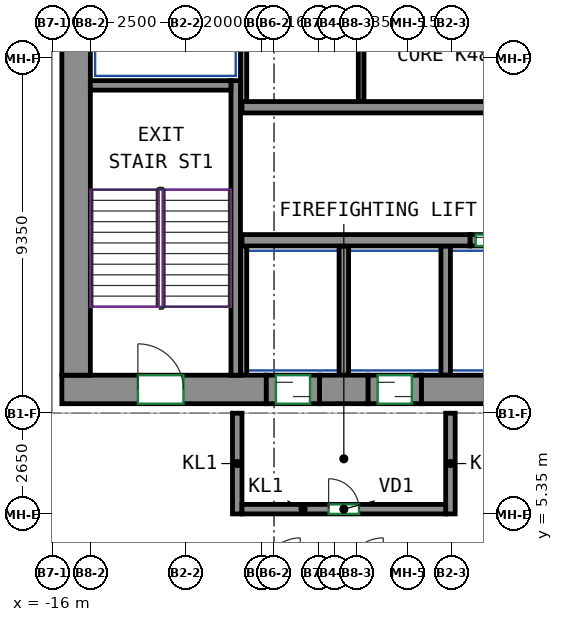
"""IFC4 building model, lengths in metres.
Left out: names, types, materials, properties, quantities, classifications, styles, units other than length and angle.
Written with IfcOpenShell. Run it as: python <this file> out.ifc"""

import sys

from ifc_helpers import new_model, si_unit, direction, frame, frame_2d, origin, place, context, subcontext, project, spatial, rectangle, extrude, source, transform, mapped, element, fill, save


model = new_model("IFC4")
c1 = context("Model", 3, precision=1e-05, world=origin(), true_north=direction((0.0, 1.0)))
c2 = subcontext(c1, "Body", "Model", "MODEL_VIEW")
j1 = project(units=[si_unit("LENGTHUNIT", "METRE"), si_unit("PLANEANGLEUNIT", "RADIAN")], contexts=[c1])
p1 = place(None, origin())
s1 = spatial("IfcSite", under=j1, at=p1, CompositionType="ELEMENT")
p2 = place(p1, origin())
s2 = spatial("IfcBuilding", under=s1, at=p2, CompositionType="ELEMENT")
p3 = place(p2, frame((0.0, 0.0, 195.7)))
s3 = spatial("IfcBuildingStorey", under=s2, at=p3, CompositionType="ELEMENT", Elevation=195.7)
m1 = source(origin(), c2, "Body", "SweptSolid", [
    extrude(rectangle(XDim=5.38, YDim=0.75, at=frame_2d((2.69, 0.0))), origin(), (0.0, 0.0, 1.0), 3.8),
])
p4 = place(p3, frame((-15.75, 8.625, 0.0), z_axis=(0.0, 0.0, 1.0), x_axis=(1.0, 0.0, 0.0)))
e1 = element("IfcWall", 1, at=p4, inside=s3, PredefinedType="SHEAR", context=c2, shape_type="MappedRepresentation", body=[
    mapped(m1, transform((0.0, 0.0, 0.0))),
])
p5 = place(p4, frame((2.0, 0.0, 0.0)))
e2 = element("IfcOpeningElement", 2, at=p5, cuts=e1, PredefinedType="OPENING", context=c2, shape_type="SweptSolid", body=[
    extrude(rectangle(XDim=1.2, YDim=2.1, at=frame_2d((0.6, 1.05))), frame((0.0, 0.385, 0.0), z_axis=(0.0, -1.0, 0.0), x_axis=(1.0, 0.0, 0.0)), (0.0, 0.0, 1.0), 0.77),
])
m2 = source(origin(), c2, "Body", "SweptSolid", [
    extrude(rectangle(XDim=1.28, YDim=0.75, at=frame_2d((0.64, 0.0))), origin(), (0.0, 0.0, 1.0), 3.8),
])
p6 = place(p3, frame((-8.97, 8.625, 0.0), z_axis=(0.0, 0.0, 1.0), x_axis=(1.0, 0.0, 0.0)))
e3 = element("IfcWall", 3, at=p6, inside=s3, PredefinedType="SHEAR", context=c2, shape_type="MappedRepresentation", body=[
    mapped(m2, transform((0.0, 0.0, 0.0))),
])
m3 = source(origin(), c2, "Body", "SweptSolid", [
    extrude(rectangle(XDim=14.18, YDim=0.75, at=frame_2d((7.09, 0.0))), origin(), (0.0, 0.0, 1.0), 3.8),
])
p7 = place(p3, frame((-6.29, 8.625, 0.0), z_axis=(0.0, 0.0, 1.0), x_axis=(1.0, 0.0, 0.0)))
e4 = element("IfcWall", 4, at=p7, inside=s3, PredefinedType="SHEAR", context=c2, shape_type="MappedRepresentation", body=[
    mapped(m3, transform((0.0, 0.0, 0.0))),
])
m4 = source(origin(), c2, "Body", "SweptSolid", [
    extrude(rectangle(XDim=12.0, YDim=0.75, at=frame_2d((6.0, 0.0))), origin(), (0.0, 0.0, 1.0), 3.8),
])
p8 = place(p3, frame((-15.375, 9.0, 0.0), z_axis=(0.0, 0.0, 1.0), x_axis=(0.0, 1.0, 0.0)))
e5 = element("IfcWall", 5, at=p8, inside=s3, PredefinedType="SHEAR", context=c2, shape_type="MappedRepresentation", body=[
    mapped(m4, transform((0.0, 0.0, 0.0))),
])
m5 = source(origin(), c2, "Body", "SweptSolid", [
    extrude(rectangle(XDim=7.75, YDim=0.25, at=frame_2d((3.875, 0.0))), origin(), (0.0, 0.0, 1.0), 3.8),
])
p9 = place(p3, frame((-11.175, 9.0, 0.0), z_axis=(0.0, 0.0, 1.0), x_axis=(0.0, 1.0, 0.0)))
e6 = element("IfcWall", 6, at=p9, inside=s3, PredefinedType="SHEAR", context=c2, shape_type="MappedRepresentation", body=[
    mapped(m5, transform((0.0, 0.0, 0.0))),
])
m6 = source(origin(), c2, "Body", "SweptSolid", [
    extrude(rectangle(XDim=3.7, YDim=0.25, at=frame_2d((1.85, 0.0))), origin(), (0.0, 0.0, 1.0), 3.8),
])
p10 = place(p3, frame((-15.0, 16.625, 0.0), z_axis=(0.0, 0.0, 1.0), x_axis=(1.0, 0.0, 0.0)))
e7 = element("IfcWall", 7, at=p10, inside=s3, PredefinedType="SHEAR", context=c2, shape_type="MappedRepresentation", body=[
    mapped(m6, transform((0.0, 0.0, 0.0))),
])
m7 = source(origin(), c2, "Body", "SweptSolid", [
    extrude(rectangle(XDim=6.0, YDim=0.3, at=frame_2d((3.0, 0.0))), origin(), (0.0, 0.0, 1.0), 3.8),
])
p11 = place(p3, frame((-11.01, 12.55, 0.0), z_axis=(0.0, 0.0, 1.0), x_axis=(1.0, 0.0, 0.0)))
e8 = element("IfcWall", 8, at=p11, inside=s3, PredefinedType="SHEAR", context=c2, shape_type="MappedRepresentation", body=[
    mapped(m7, transform((0.0, 0.0, 0.0))),
])
m8 = source(origin(), c2, "Body", "SweptSolid", [
    extrude(rectangle(XDim=14.04, YDim=0.3, at=frame_2d((7.02, 0.0))), origin(), (0.0, 0.0, 1.0), 3.8),
])
p12 = place(p3, frame((-11.01, 16.05, 0.0), z_axis=(0.0, 0.0, 1.0), x_axis=(1.0, 0.0, 0.0)))
e9 = element("IfcWall", 9, at=p12, inside=s3, PredefinedType="SHEAR", context=c2, shape_type="MappedRepresentation", body=[
    mapped(m8, transform((0.0, 0.0, 0.0))),
])
m9 = source(origin(), c2, "Body", "SweptSolid", [
    extrude(rectangle(XDim=1.4, YDim=0.3, at=frame_2d((0.7, 0.0))), origin(), (0.0, 0.0, 1.0), 3.8),
])
p13 = place(p3, frame((-5.01, 12.55, 0.0), z_axis=(0.0, 0.0, 1.0), x_axis=(1.0, 0.0, 0.0)))
e10 = element("IfcWall", 10, at=p13, inside=s3, PredefinedType="PARTITIONING", context=c2, shape_type="MappedRepresentation", body=[
    mapped(m9, transform((0.0, 0.0, 0.0))),
])
p14 = place(p13, frame((0.15, 0.0, 0.0)))
e11 = element("IfcOpeningElement", 11, at=p14, cuts=e10, PredefinedType="OPENING", context=c2, shape_type="SweptSolid", body=[
    extrude(rectangle(XDim=1.1, YDim=2.1, at=frame_2d((0.55, 1.05))), frame((0.0, 0.16, 0.0), z_axis=(0.0, -1.0, 0.0), x_axis=(1.0, 0.0, 0.0)), (0.0, 0.0, 1.0), 0.32),
])
m10 = source(origin(), c2, "Body", "SweptSolid", [
    extrude(rectangle(XDim=2.65, YDim=0.25, at=frame_2d((1.325, 0.0))), origin(), (0.0, 0.0, 1.0), 3.8),
])
for number, where, z_axis, x_axis in (
    (12, (-11.135, 5.35, 0.0), (0.0, 0.0, 1.0), (0.0, 1.0, 0.0)),
    (13, (-5.525, 5.35, 0.0), (0.0, 0.0, 1.0), (0.0, 1.0, 0.0)),
):
    element("IfcWall", number, at=place(p3, frame(where, z_axis=z_axis, x_axis=x_axis)), inside=s3, PredefinedType="PARTITIONING", context=c2, shape_type="MappedRepresentation", body=[
        mapped(m10, transform((0.0, 0.0, 0.0))),
    ])
m11 = source(origin(), c2, "Body", "SweptSolid", [
    extrude(rectangle(XDim=5.36, YDim=0.25, at=frame_2d((2.68, 0.0))), origin(), (0.0, 0.0, 1.0), 3.8),
])
p15 = place(p3, frame((-11.01, 5.475, 0.0), z_axis=(0.0, 0.0, 1.0), x_axis=(1.0, 0.0, 0.0)))
e14 = element("IfcWall", 14, at=p15, inside=s3, PredefinedType="PARTITIONING", context=c2, shape_type="MappedRepresentation", body=[
    mapped(m11, transform((0.0, 0.0, 0.0))),
])
p16 = place(p15, frame((2.28, 0.0, 0.0)))
e15 = element("IfcOpeningElement", 15, at=p16, cuts=e14, PredefinedType="OPENING", context=c2, shape_type="SweptSolid", body=[
    extrude(rectangle(XDim=0.8, YDim=2.0, at=frame_2d((0.4, 1.0))), frame((0.0, 0.135, 0.0), z_axis=(0.0, -1.0, 0.0), x_axis=(1.0, 0.0, 0.0)), (0.0, 0.0, 1.0), 0.27),
])
m12 = source(origin(), c2, "Body", "SweptSolid", [
    extrude(rectangle(XDim=4.8, YDim=0.165, at=frame_2d((2.4, 0.0))), origin(), (0.0, 0.0, 1.0), 3.8),
])
p17 = place(p3, frame((-10.968, 16.2, 0.0), z_axis=(0.0, 0.0, 1.0), x_axis=(0.0, 1.0, 0.0)))
e16 = element("IfcWall", 16, at=p17, inside=s3, PredefinedType="PARTITIONING", context=c2, shape_type="MappedRepresentation", body=[
    mapped(m12, transform((0.0, 0.0, 0.0))),
])
m13 = source(origin(), c2, "Body", "SweptSolid", [
    extrude(rectangle(XDim=3.4, YDim=0.165, at=frame_2d((1.7, 0.0))), origin(), (0.0, 0.0, 1.0), 3.8),
])
p18 = place(p3, frame((-10.968, 9.0, 0.0), z_axis=(0.0, 0.0, 1.0), x_axis=(0.0, 1.0, 0.0)))
e17 = element("IfcWall", 17, at=p18, inside=s3, PredefinedType="PARTITIONING", context=c2, shape_type="MappedRepresentation", body=[
    mapped(m13, transform((0.0, 0.0, 0.0))),
])
m14 = source(origin(), c2, "Body", "SweptSolid", [
    extrude(rectangle(XDim=3.4, YDim=0.25, at=frame_2d((1.7, 0.0))), origin(), (0.0, 0.0, 1.0), 3.8),
])
for number, where, z_axis, x_axis in (
    (18, (-5.65, 9.0, 0.0), (0.0, 0.0, 1.0), (0.0, 1.0, 0.0)),
    (19, (-8.33, 9.0, 0.0), (0.0, 0.0, 1.0), (0.0, 1.0, 0.0)),
):
    element("IfcWall", number, at=place(p3, frame(where, z_axis=z_axis, x_axis=x_axis)), inside=s3, PredefinedType="PARTITIONING", context=c2, shape_type="MappedRepresentation", body=[
        mapped(m14, transform((0.0, 0.0, 0.0))),
    ])
m15 = source(origin(), c2, "Body", "SweptSolid", [
    extrude(rectangle(XDim=4.8, YDim=0.15, at=frame_2d((2.4, 0.0))), origin(), (0.0, 0.0, 1.0), 3.8),
])
p19 = place(p3, frame((-7.875, 16.2, 0.0), z_axis=(0.0, 0.0, 1.0), x_axis=(0.0, 1.0, 0.0)))
e20 = element("IfcWall", 20, at=p19, inside=s3, PredefinedType="PARTITIONING", context=c2, shape_type="MappedRepresentation", body=[
    mapped(m15, transform((0.0, 0.0, 0.0))),
])
m16 = source(origin(), c2, "Body", "SweptSolid", [
    extrude(rectangle(XDim=1.4, YDim=0.75, at=frame_2d((0.7, 0.0))), origin(), (0.0, 0.0, 1.0), 2.7),
])
p20 = place(p3, frame((-10.37, 8.625, 0.0), z_axis=(0.0, 0.0, 1.0), x_axis=(1.0, 0.0, 0.0)))
e21 = element("IfcWall", 21, at=p20, inside=s3, PredefinedType="PARTITIONING", context=c2, shape_type="MappedRepresentation", body=[
    mapped(m16, transform((0.0, 0.0, 0.0))),
])
p21 = place(p20, frame((0.25, 0.0, 0.0)))
e22 = element("IfcOpeningElement", 22, at=p21, cuts=e21, PredefinedType="OPENING", context=c2, shape_type="SweptSolid", body=[
    extrude(rectangle(XDim=0.9, YDim=2.1, at=frame_2d((0.45, 1.05))), frame((0.0, 0.385, 0.0), z_axis=(0.0, -1.0, 0.0), x_axis=(1.0, 0.0, 0.0)), (0.0, 0.0, 1.0), 0.77),
])
m17 = source(origin(), c2, "Body", "SweptSolid", [
    extrude(rectangle(XDim=1.4, YDim=0.75, at=frame_2d((0.7, 0.0))), origin(), (0.0, 0.0, 1.0), 2.7),
])
p22 = place(p3, frame((-7.69, 8.625, 0.0), z_axis=(0.0, 0.0, 1.0), x_axis=(1.0, 0.0, 0.0)))
e23 = element("IfcWall", 23, at=p22, inside=s3, PredefinedType="PARTITIONING", context=c2, shape_type="MappedRepresentation", body=[
    mapped(m17, transform((0.0, 0.0, 0.0))),
])
p23 = place(p22, frame((0.25, 0.0, 0.0)))
e24 = element("IfcOpeningElement", 24, at=p23, cuts=e23, PredefinedType="OPENING", context=c2, shape_type="SweptSolid", body=[
    extrude(rectangle(XDim=0.9, YDim=2.1, at=frame_2d((0.45, 1.05))), frame((0.0, 0.385, 0.0), z_axis=(0.0, -1.0, 0.0), x_axis=(1.0, 0.0, 0.0)), (0.0, 0.0, 1.0), 0.77),
])
p24 = place(p16, origin())
e25 = element("IfcDoor", 25, at=p24, inside=s3, OperationType="SINGLE_SWING_LEFT", PredefinedType="DOOR", context=c2, shape_type="SweptSolid", body=[
    extrude(rectangle(XDim=0.8, YDim=2.0, at=frame_2d((0.4, 1.0))), frame((0.0, 0.025, 0.0), z_axis=(0.0, -1.0, 0.0), x_axis=(1.0, 0.0, 0.0)), (0.0, 0.0, 1.0), 0.05),
])
fill(e15, e25)
p25 = place(p21, origin())
e26 = element("IfcDoor", 26, at=p25, inside=s3, OperationType="SLIDING_TO_LEFT", PredefinedType="DOOR", context=c2, shape_type="SweptSolid", body=[
    extrude(rectangle(XDim=0.9, YDim=2.1, at=frame_2d((0.45, 1.05))), frame((0.0, 0.28, 0.0), z_axis=(0.0, -1.0, 0.0), x_axis=(1.0, 0.0, 0.0)), (0.0, 0.0, 1.0), 0.05),
])
fill(e22, e26)
p26 = place(p23, origin())
e27 = element("IfcDoor", 27, at=p26, inside=s3, OperationType="SLIDING_TO_RIGHT", PredefinedType="DOOR", context=c2, shape_type="SweptSolid", body=[
    extrude(rectangle(XDim=0.9, YDim=2.1, at=frame_2d((0.45, 1.05))), frame((0.0, 0.28, 0.0), z_axis=(0.0, -1.0, 0.0), x_axis=(1.0, 0.0, 0.0)), (0.0, 0.0, 1.0), 0.05),
])
fill(e24, e27)
p27 = place(p14, origin())
e28 = element("IfcDoor", 28, at=p27, inside=s3, OperationType="DOUBLE_DOOR_SLIDING", PredefinedType="DOOR", context=c2, shape_type="SweptSolid", body=[
    extrude(rectangle(XDim=1.1, YDim=2.1, at=frame_2d((0.55, 1.05))), frame((0.0, 0.025, 0.0), z_axis=(0.0, -1.0, 0.0), x_axis=(1.0, 0.0, 0.0)), (0.0, 0.0, 1.0), 0.05),
])
fill(e11, e28)
p28 = place(p5, origin())
e29 = element("IfcDoor", 29, at=p28, inside=s3, OperationType="DOUBLE_DOOR_SINGLE_SWING", PredefinedType="DOOR", context=c2, shape_type="SweptSolid", body=[
    extrude(rectangle(XDim=1.2, YDim=2.1, at=frame_2d((0.6, 1.05))), frame((0.0, 0.28, 0.0), z_axis=(0.0, -1.0, 0.0), x_axis=(1.0, 0.0, 0.0)), (0.0, 0.0, 1.0), 0.05),
])
fill(e2, e29)
save(model, sys.argv[1])
